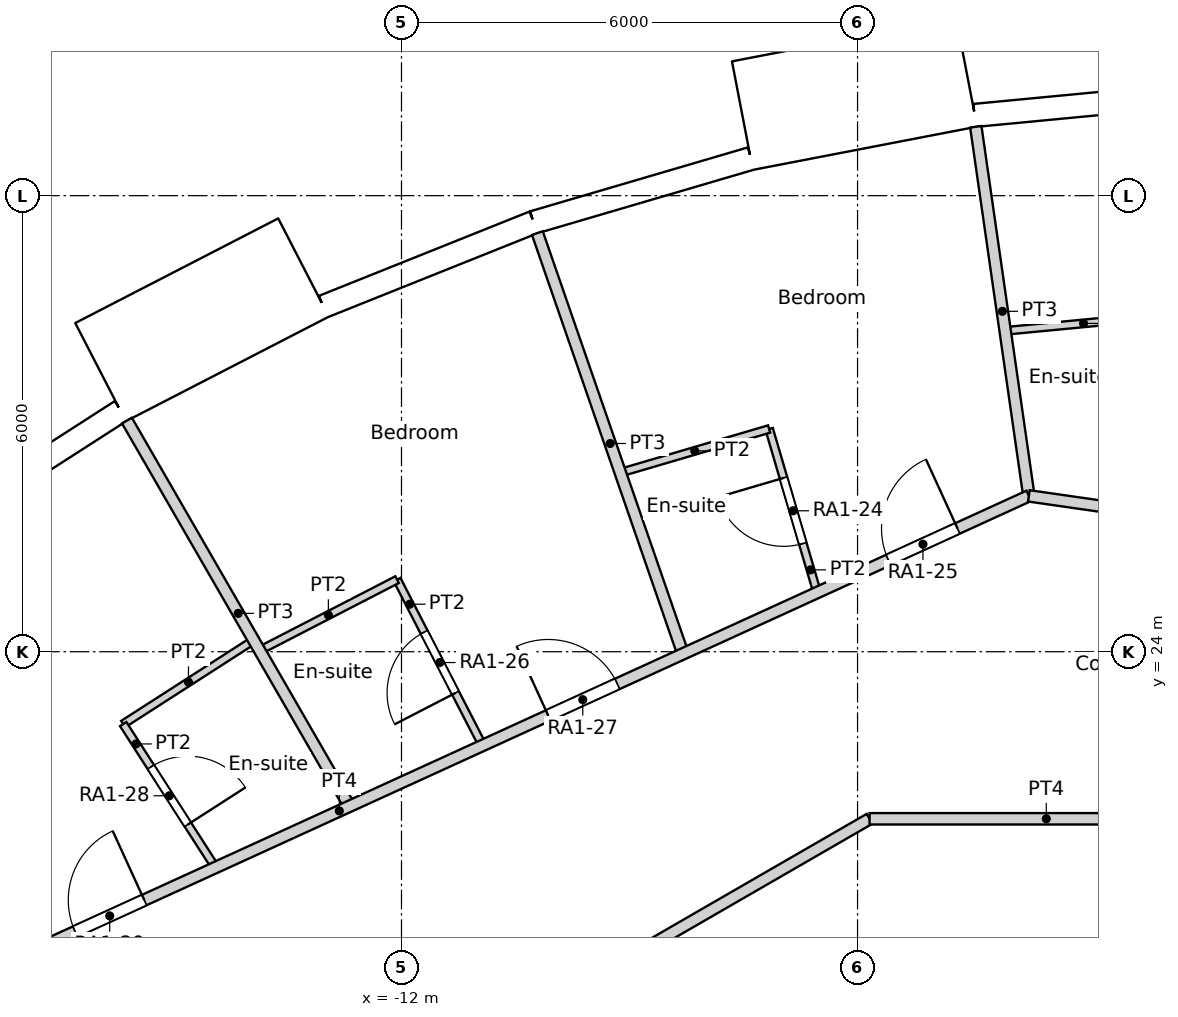
"""IFC4 building model, lengths in metres.
Left out: names, types, materials, properties, quantities, classifications, styles, units other than length and angle.
Written with IfcOpenShell. Run it as: python <this file> out.ifc"""

import sys

from ifc_helpers import new_model, si_unit, direction, frame, frame_2d, origin, origin_2d, place, context, subcontext, project, spatial, rectangle, circle, extrude, element, fill, save


model = new_model("IFC4")
c1 = context("Model", 3, precision=1e-05, world=origin(), true_north=direction((0.0, 1.0)))
c2 = subcontext(c1, "Body", "Model", "MODEL_VIEW")
j1 = project(units=[si_unit("LENGTHUNIT", "METRE"), si_unit("PLANEANGLEUNIT", "RADIAN")], contexts=[c1])
p1 = place(None, origin())
s1 = spatial("IfcSite", under=j1, at=p1, CompositionType="ELEMENT")
p2 = place(p1, origin())
s2 = spatial("IfcBuilding", under=s1, at=p2, CompositionType="ELEMENT")
p3 = place(p2, frame((0.0, 0.0, 28.2)))
s3 = spatial("IfcBuildingStorey", under=s2, at=p3, CompositionType="ELEMENT", Elevation=28.2)
for number, where, z_axis, x_axis in (
    (1, (-4.309, 29.966, 0.0), (0.0, 0.0, 1.0), (1.0, 0.0, 0.0)),
    (2, (-9.902, 28.61, 0.0), (0.0, 0.0, 1.0), (1.0, 0.0, 0.0)),
    (3, (-15.137, 26.219, 0.0), (0.0, 0.0, 1.0), (1.0, 0.0, 0.0)),
):
    element("IfcColumn", number, at=place(p3, frame(where, z_axis=z_axis, x_axis=x_axis)), inside=s3, PredefinedType="COLUMN", context=c2, shape_type="SweptSolid", body=[
        extrude(circle(Radius=0.7, at=origin_2d()), origin(), (0.0, 0.0, 1.0), 3.6),
    ])
for number, where, z_axis, x_axis in (
    (4, (-7.04, 23.516, 0.0), (0.0, 0.0, 1.0), (1.0, 0.0, 0.0)),
    (5, (-12.274, 21.259, 0.0), (0.0, 0.0, 1.0), (1.0, 0.0, 0.0)),
):
    element("IfcColumn", number, at=place(p3, frame(where, z_axis=z_axis, x_axis=x_axis)), inside=s3, PredefinedType="COLUMN", context=c2, shape_type="SweptSolid", body=[
        extrude(circle(Radius=0.75, at=origin_2d()), origin(), (0.0, 0.0, 1.0), 3.6),
    ])
p4 = place(p3, frame((-1.493, 31.339, 0.0), z_axis=(0.0, 0.0, 1.0), x_axis=(-0.995472611385, -0.095048829468, 0.0)))
e6 = element("IfcWall", 6, at=p4, inside=s3, PredefinedType="SOLIDWALL", context=c2, shape_type="SweptSolid", body=[
    extrude(rectangle(XDim=2.979, YDim=0.3, at=frame_2d((1.49, 0.0))), origin(), (0.0, 0.0, 1.0), 3.15),
])
p5 = place(p4, frame((1.49, 0.0, 1.55)))
e7 = element("IfcOpeningElement", 7, at=p5, cuts=e6, PredefinedType="OPENING", context=c2, shape_type="SweptSolid", body=[
    extrude(circle(Radius=0.9, at=origin_2d()), frame((0.0, 0.16, 0.0), z_axis=(0.0, -1.0, 0.0), x_axis=(1.0, 0.0, 0.0)), (0.0, 0.0, 1.0), 0.32),
])
p6 = place(p3, frame((-4.567, 31.621, -0.45), z_axis=(0.0, 0.0, 1.0), x_axis=(-0.981921602273, -0.189288052949, 0.0)))
e8 = element("IfcWall", 8, at=p6, inside=s3, PredefinedType="ELEMENTEDWALL", context=c2, shape_type="SweptSolid", body=[
    extrude(rectangle(XDim=3.0, YDim=1.45, at=frame_2d((1.5, 0.0))), origin(), (0.0, 0.0, 1.0), 3.6),
])
p7 = place(p6, frame((1.5, 0.0, 2.0)))
e9 = element("IfcOpeningElement", 9, at=p7, cuts=e8, PredefinedType="OPENING", context=c2, shape_type="SweptSolid", body=[
    extrude(circle(Radius=0.9, at=origin_2d()), frame((0.0, 0.735, 0.0), z_axis=(0.0, -1.0, 0.0), x_axis=(1.0, 0.0, 0.0)), (0.0, 0.0, 1.0), 1.47),
])
p8 = place(p3, frame((-7.403, 30.488, 0.0), z_axis=(0.0, 0.0, 1.0), x_axis=(-0.959501085144, -0.281704930036, 0.0)))
e10 = element("IfcWall", 10, at=p8, inside=s3, PredefinedType="SOLIDWALL", context=c2, shape_type="SweptSolid", body=[
    extrude(rectangle(XDim=2.979, YDim=0.3, at=frame_2d((1.49, 0.0))), origin(), (0.0, 0.0, 1.0), 3.15),
])
p9 = place(p8, frame((1.49, 0.0, 1.55)))
e11 = element("IfcOpeningElement", 11, at=p9, cuts=e10, PredefinedType="OPENING", context=c2, shape_type="SweptSolid", body=[
    extrude(circle(Radius=0.9, at=origin_2d()), frame((0.0, 0.16, 0.0), z_axis=(0.0, -1.0, 0.0), x_axis=(1.0, 0.0, 0.0)), (0.0, 0.0, 1.0), 0.32),
])
p10 = place(p3, frame((-10.261, 29.649, 0.0), z_axis=(0.0, 0.0, 1.0), x_axis=(-0.928374947, -0.371644935098, 0.0)))
e12 = element("IfcWall", 12, at=p10, inside=s3, PredefinedType="SOLIDWALL", context=c2, shape_type="SweptSolid", body=[
    extrude(rectangle(XDim=2.98, YDim=0.3, at=frame_2d((1.49, 0.0))), origin(), (0.0, 0.0, 1.0), 3.15),
])
p11 = place(p10, frame((1.49, 0.0, 1.55)))
e13 = element("IfcOpeningElement", 13, at=p11, cuts=e12, PredefinedType="OPENING", context=c2, shape_type="SweptSolid", body=[
    extrude(circle(Radius=0.9, at=origin_2d()), frame((0.0, 0.16, 0.0), z_axis=(0.0, -1.0, 0.0), x_axis=(1.0, 0.0, 0.0)), (0.0, 0.0, 1.0), 0.32),
])
p12 = place(p3, frame((-13.291, 29.053, -0.45), z_axis=(0.0, 0.0, 1.0), x_axis=(-0.888858064689, -0.458182650083, 0.0)))
e14 = element("IfcWall", 14, at=p12, inside=s3, PredefinedType="ELEMENTEDWALL", context=c2, shape_type="SweptSolid", body=[
    extrude(rectangle(XDim=3.0, YDim=1.45, at=frame_2d((1.5, 0.0))), origin(), (0.0, 0.0, 1.0), 3.6),
])
p13 = place(p12, frame((1.5, 0.0, 2.0)))
e15 = element("IfcOpeningElement", 15, at=p13, cuts=e14, PredefinedType="OPENING", context=c2, shape_type="SweptSolid", body=[
    extrude(circle(Radius=0.9, at=origin_2d()), frame((0.0, 0.735, 0.0), z_axis=(0.0, -1.0, 0.0), x_axis=(1.0, 0.0, 0.0)), (0.0, 0.0, 1.0), 1.47),
])
p14 = place(p3, frame((-15.692, 27.168, 0.0), z_axis=(0.0, 0.0, 1.0), x_axis=(-0.841260995538, -0.54062920508, 0.0)))
e16 = element("IfcWall", 16, at=p14, inside=s3, PredefinedType="SOLIDWALL", context=c2, shape_type="SweptSolid", body=[
    extrude(rectangle(XDim=2.979, YDim=0.3, at=frame_2d((1.49, 0.0))), origin(), (0.0, 0.0, 1.0), 3.15),
])
p15 = place(p14, frame((1.49, 0.0, 1.55)))
e17 = element("IfcOpeningElement", 17, at=p15, cuts=e16, PredefinedType="OPENING", context=c2, shape_type="SweptSolid", body=[
    extrude(circle(Radius=0.9, at=origin_2d()), frame((0.0, 0.16, 0.0), z_axis=(0.0, -1.0, 0.0), x_axis=(1.0, 0.0, 0.0)), (0.0, 0.0, 1.0), 0.32),
])
p16 = place(p3, frame((-5.842, 21.802, 0.0), z_axis=(0.0, 0.0, 1.0), x_axis=(1.0, 0.0, 0.0)))
e18 = element("IfcWall", 18, at=p16, inside=s3, PredefinedType="PARTITIONING", context=c2, shape_type="SweptSolid", body=[
    extrude(rectangle(XDim=4.65, YDim=0.15, at=frame_2d((2.325, 0.0))), origin(), (0.0, 0.0, 1.0), 3.15),
])
p17 = place(p3, frame((-14.0, 17.092, 0.0), z_axis=(0.0, 0.0, 1.0), x_axis=(0.86602719091, 0.499996904595, 0.0)))
e19 = element("IfcWall", 19, at=p17, inside=s3, PredefinedType="PARTITIONING", context=c2, shape_type="SweptSolid", body=[
    extrude(rectangle(XDim=9.42, YDim=0.15, at=frame_2d((4.71, 0.0))), origin(), (0.0, 0.0, 1.0), 3.15),
])
p18 = place(p3, frame((-3.746, 26.051, 0.0), z_axis=(0.0, 0.0, 1.0), x_axis=(0.989821009857, -0.142317843033, 0.0)))
e20 = element("IfcWall", 20, at=p18, inside=s3, PredefinedType="PARTITIONING", context=c2, shape_type="SweptSolid", body=[
    extrude(rectangle(XDim=14.83, YDim=0.15, at=frame_2d((7.415, 0.0))), origin(), (0.0, 0.0, 1.0), 3.15),
])
p19 = place(p18, frame((9.415, 0.0, 0.0)))
e21 = element("IfcOpeningElement", 21, at=p19, cuts=e20, PredefinedType="OPENING", context=c2, shape_type="SweptSolid", body=[
    extrude(rectangle(XDim=1.8, YDim=2.1, at=frame_2d((0.9, 1.05))), frame((0.0, 0.075, 0.0), z_axis=(0.0, -1.0, 0.0), x_axis=(1.0, 0.0, 0.0)), (0.0, 0.0, 1.0), 0.15),
])
p20 = place(p18, frame((3.314, 0.0, 0.0)))
e22 = element("IfcOpeningElement", 22, at=p20, cuts=e20, PredefinedType="OPENING", context=c2, shape_type="SweptSolid", body=[
    extrude(rectangle(XDim=1.0, YDim=2.1, at=frame_2d((0.5, 1.05))), frame((0.0, 0.075, 0.0), z_axis=(0.0, -1.0, 0.0), x_axis=(1.0, 0.0, 0.0)), (0.0, 0.0, 1.0), 0.15),
])
p21 = place(p3, frame((-17.234, 19.888, 0.0), z_axis=(0.0, 0.0, 1.0), x_axis=(0.90953867323, 0.415619299238, 0.0)))
e23 = element("IfcWall", 23, at=p21, inside=s3, PredefinedType="PARTITIONING", context=c2, shape_type="SweptSolid", body=[
    extrude(rectangle(XDim=14.829, YDim=0.15, at=frame_2d((7.415, 0.0))), origin(), (0.0, 0.0, 1.0), 3.15),
])
p22 = place(p21, frame((12.797, 0.0, 0.0)))
e24 = element("IfcOpeningElement", 24, at=p22, cuts=e23, PredefinedType="OPENING", context=c2, shape_type="SweptSolid", body=[
    extrude(rectangle(XDim=1.0, YDim=2.1, at=frame_2d((0.5, 1.05))), frame((0.0, 0.075, 0.0), z_axis=(0.0, -1.0, 0.0), x_axis=(1.0, 0.0, 0.0)), (0.0, 0.0, 1.0), 0.15),
])
p23 = place(p21, frame((7.877, 0.0, 0.0)))
e25 = element("IfcOpeningElement", 25, at=p23, cuts=e23, PredefinedType="OPENING", context=c2, shape_type="SweptSolid", body=[
    extrude(rectangle(XDim=1.0, YDim=2.1, at=frame_2d((0.5, 1.05))), frame((0.0, 0.075, 0.0), z_axis=(0.0, -1.0, 0.0), x_axis=(1.0, 0.0, 0.0)), (0.0, 0.0, 1.0), 0.15),
])
p24 = place(p21, frame((1.034, 0.0, 0.0)))
e26 = element("IfcOpeningElement", 26, at=p24, cuts=e23, PredefinedType="OPENING", context=c2, shape_type="SweptSolid", body=[
    extrude(rectangle(XDim=1.0, YDim=2.1, at=frame_2d((0.5, 1.05))), frame((0.0, 0.075, 0.0), z_axis=(0.0, -1.0, 0.0), x_axis=(1.0, 0.0, 0.0)), (0.0, 0.0, 1.0), 0.15),
])
p25 = place(p3, frame((-4.058, 28.221, 0.0), z_axis=(0.0, 0.0, 1.0), x_axis=(0.995466291052, 0.095115000814, 0.0)))
e27 = element("IfcWall", 27, at=p25, inside=s3, PredefinedType="PARTITIONING", context=c2, shape_type="SweptSolid", body=[
    extrude(rectangle(XDim=2.071, YDim=0.1, at=frame_2d((1.036, 0.0))), origin(), (0.0, 0.0, 1.0), 3.15),
])
p26 = place(p3, frame((-4.444, 30.906, 0.0), z_axis=(0.0, 0.0, 1.0), x_axis=(0.142306296561, -0.989822669956, 0.0)))
e28 = element("IfcWall", 28, at=p26, inside=s3, PredefinedType="PARTITIONING", context=c2, shape_type="SweptSolid", body=[
    extrude(rectangle(XDim=4.905, YDim=0.15, at=frame_2d((2.452, 0.0))), origin(), (0.0, 0.0, 1.0), 3.15),
])
p27 = place(p3, frame((-7.163, 26.93, 0.0), z_axis=(0.0, 0.0, 1.0), x_axis=(0.281948165188, -0.959429638977, 0.0)))
e29 = element("IfcWall", 29, at=p27, inside=s3, PredefinedType="PARTITIONING", context=c2, shape_type="SweptSolid", body=[
    extrude(rectangle(XDim=2.242, YDim=0.1, at=frame_2d((1.121, 0.0))), origin(), (0.0, 0.0, 1.0), 3.15),
])
p28 = place(p27, frame((0.671, 0.0, 0.0)))
e30 = element("IfcOpeningElement", 30, at=p28, cuts=e29, PredefinedType="OPENING", context=c2, shape_type="SweptSolid", body=[
    extrude(rectangle(XDim=0.9, YDim=2.04, at=frame_2d((0.45, 1.02))), frame((0.0, 0.05, 0.0), z_axis=(0.0, -1.0, 0.0), x_axis=(1.0, 0.0, 0.0)), (0.0, 0.0, 1.0), 0.1),
])
p29 = place(p3, frame((-9.121, 26.355, 0.0), z_axis=(0.0, 0.0, 1.0), x_axis=(0.95948923736, 0.281745281045, 0.0)))
e31 = element("IfcWall", 31, at=p29, inside=s3, PredefinedType="PARTITIONING", context=c2, shape_type="SweptSolid", body=[
    extrude(rectangle(XDim=2.041, YDim=0.1, at=frame_2d((1.021, 0.0))), origin(), (0.0, 0.0, 1.0), 3.15),
])
p30 = place(p3, frame((-10.212, 29.507, 0.0), z_axis=(0.0, 0.0, 1.0), x_axis=(0.327061884856, -0.945002922469, 0.0)))
e32 = element("IfcWall", 32, at=p30, inside=s3, PredefinedType="PARTITIONING", context=c2, shape_type="SweptSolid", body=[
    extrude(rectangle(XDim=5.857, YDim=0.15, at=frame_2d((2.928, 0.0))), origin(), (0.0, 0.0, 1.0), 3.15),
])
p31 = place(p3, frame((-12.058, 24.948, 0.0), z_axis=(0.0, 0.0, 1.0), x_axis=(0.458287904527, -0.888803800939, 0.0)))
e33 = element("IfcWall", 33, at=p31, inside=s3, PredefinedType="PARTITIONING", context=c2, shape_type="SweptSolid", body=[
    extrude(rectangle(XDim=2.453, YDim=0.1, at=frame_2d((1.226, 0.0))), origin(), (0.0, 0.0, 1.0), 3.15),
])
p32 = place(p31, frame((0.777, 0.0, 0.0)))
e34 = element("IfcOpeningElement", 34, at=p32, cuts=e33, PredefinedType="OPENING", context=c2, shape_type="SweptSolid", body=[
    extrude(rectangle(XDim=0.9, YDim=2.04, at=frame_2d((0.45, 1.02))), frame((0.0, 0.05, 0.0), z_axis=(0.0, -1.0, 0.0), x_axis=(1.0, 0.0, 0.0)), (0.0, 0.0, 1.0), 0.1),
])
p33 = place(p3, frame((-13.866, 24.016, 0.0), z_axis=(0.0, 0.0, 1.0), x_axis=(0.888861985525, 0.45817504372, 0.0)))
e35 = element("IfcWall", 35, at=p33, inside=s3, PredefinedType="PARTITIONING", context=c2, shape_type="SweptSolid", body=[
    extrude(rectangle(XDim=2.034, YDim=0.1, at=frame_2d((1.017, 0.0))), origin(), (0.0, 0.0, 1.0), 3.15),
])
p34 = place(p3, frame((-15.612, 27.041, 0.0), z_axis=(0.0, 0.0, 1.0), x_axis=(0.499824700643, -0.866126589262, 0.0)))
e36 = element("IfcWall", 36, at=p34, inside=s3, PredefinedType="PARTITIONING", context=c2, shape_type="SweptSolid", body=[
    extrude(rectangle(XDim=5.856, YDim=0.15, at=frame_2d((2.928, 0.0))), origin(), (0.0, 0.0, 1.0), 3.15),
])
p35 = place(p3, frame((-15.661, 23.048, 0.0), z_axis=(0.0, 0.0, 1.0), x_axis=(0.84110074148, 0.540878491606, 0.0)))
e37 = element("IfcWall", 37, at=p35, inside=s3, PredefinedType="PARTITIONING", context=c2, shape_type="SweptSolid", body=[
    extrude(rectangle(XDim=2.041, YDim=0.1, at=frame_2d((1.021, 0.0))), origin(), (0.0, 0.0, 1.0), 3.15),
])
p36 = place(p3, frame((-15.661, 23.048, 0.0), z_axis=(0.0, 0.0, 1.0), x_axis=(0.540796133976, -0.841153696702, 0.0)))
e38 = element("IfcWall", 38, at=p36, inside=s3, PredefinedType="PARTITIONING", context=c2, shape_type="SweptSolid", body=[
    extrude(rectangle(XDim=2.241, YDim=0.1, at=frame_2d((1.121, 0.0))), origin(), (0.0, 0.0, 1.0), 3.15),
])
p37 = place(p36, frame((0.671, 0.0, 0.0)))
e39 = element("IfcOpeningElement", 39, at=p37, cuts=e38, PredefinedType="OPENING", context=c2, shape_type="SweptSolid", body=[
    extrude(rectangle(XDim=0.9, YDim=2.04, at=frame_2d((0.45, 1.02))), frame((0.0, 0.05, 0.0), z_axis=(0.0, -1.0, 0.0), x_axis=(1.0, 0.0, 0.0)), (0.0, 0.0, 1.0), 0.1),
])
p38 = place(p5, origin())
e40 = element("IfcWindow", 40, at=p38, inside=s3, PartitioningType="SINGLE_PANEL", PredefinedType="WINDOW", context=c2, shape_type="SweptSolid", body=[
    extrude(circle(Radius=0.9, at=origin_2d()), frame((0.0, 0.12, 0.0), z_axis=(0.0, -1.0, 0.0), x_axis=(1.0, 0.0, 0.0)), (0.0, 0.0, 1.0), 0.1),
])
fill(e7, e40)
p39 = place(p7, origin())
e41 = element("IfcWindow", 41, at=p39, inside=s3, PartitioningType="SINGLE_PANEL", PredefinedType="WINDOW", context=c2, shape_type="SweptSolid", body=[
    extrude(circle(Radius=0.9, at=origin_2d()), frame((0.0, 0.695, 0.0), z_axis=(0.0, -1.0, 0.0), x_axis=(1.0, 0.0, 0.0)), (0.0, 0.0, 1.0), 0.1),
])
fill(e9, e41)
p40 = place(p9, origin())
e42 = element("IfcWindow", 42, at=p40, inside=s3, PartitioningType="SINGLE_PANEL", PredefinedType="WINDOW", context=c2, shape_type="SweptSolid", body=[
    extrude(circle(Radius=0.9, at=origin_2d()), frame((0.0, 0.12, 0.0), z_axis=(0.0, -1.0, 0.0), x_axis=(1.0, 0.0, 0.0)), (0.0, 0.0, 1.0), 0.1),
])
fill(e11, e42)
p41 = place(p11, origin())
e43 = element("IfcWindow", 43, at=p41, inside=s3, PartitioningType="SINGLE_PANEL", PredefinedType="WINDOW", context=c2, shape_type="SweptSolid", body=[
    extrude(circle(Radius=0.9, at=origin_2d()), frame((0.0, 0.12, 0.0), z_axis=(0.0, -1.0, 0.0), x_axis=(1.0, 0.0, 0.0)), (0.0, 0.0, 1.0), 0.1),
])
fill(e13, e43)
p42 = place(p13, origin())
e44 = element("IfcWindow", 44, at=p42, inside=s3, PartitioningType="SINGLE_PANEL", PredefinedType="WINDOW", context=c2, shape_type="SweptSolid", body=[
    extrude(circle(Radius=0.9, at=origin_2d()), frame((0.0, 0.695, 0.0), z_axis=(0.0, -1.0, 0.0), x_axis=(1.0, 0.0, 0.0)), (0.0, 0.0, 1.0), 0.1),
])
fill(e15, e44)
p43 = place(p15, origin())
e45 = element("IfcWindow", 45, at=p43, inside=s3, PartitioningType="SINGLE_PANEL", PredefinedType="WINDOW", context=c2, shape_type="SweptSolid", body=[
    extrude(circle(Radius=0.9, at=origin_2d()), frame((0.0, 0.12, 0.0), z_axis=(0.0, -1.0, 0.0), x_axis=(1.0, 0.0, 0.0)), (0.0, 0.0, 1.0), 0.1),
])
fill(e17, e45)
p44 = place(p28, origin())
e46 = element("IfcDoor", 46, at=p44, inside=s3, OperationType="SINGLE_SWING_RIGHT", PredefinedType="DOOR", context=c2, shape_type="SweptSolid", body=[
    extrude(rectangle(XDim=0.9, YDim=2.04, at=frame_2d((0.45, 1.02))), frame((0.0, 0.025, 0.0), z_axis=(0.0, -1.0, 0.0), x_axis=(1.0, 0.0, 0.0)), (0.0, 0.0, 1.0), 0.05),
])
fill(e30, e46)
p45 = place(p22, origin())
e47 = element("IfcDoor", 47, at=p45, inside=s3, OperationType="SINGLE_SWING_RIGHT", PredefinedType="DOOR", context=c2, shape_type="SweptSolid", body=[
    extrude(rectangle(XDim=1.0, YDim=2.1, at=frame_2d((0.5, 1.05))), frame((0.0, 0.025, 0.0), z_axis=(0.0, -1.0, 0.0), x_axis=(1.0, 0.0, 0.0)), (0.0, 0.0, 1.0), 0.05),
])
fill(e24, e47)
p46 = place(p32, origin())
e48 = element("IfcDoor", 48, at=p46, inside=s3, OperationType="SINGLE_SWING_LEFT", PredefinedType="DOOR", context=c2, shape_type="SweptSolid", body=[
    extrude(rectangle(XDim=0.9, YDim=2.04, at=frame_2d((0.45, 1.02))), frame((0.0, 0.025, 0.0), z_axis=(0.0, -1.0, 0.0), x_axis=(1.0, 0.0, 0.0)), (0.0, 0.0, 1.0), 0.05),
])
fill(e34, e48)
p47 = place(p23, origin())
e49 = element("IfcDoor", 49, at=p47, inside=s3, OperationType="SINGLE_SWING_LEFT", PredefinedType="DOOR", context=c2, shape_type="SweptSolid", body=[
    extrude(rectangle(XDim=1.0, YDim=2.1, at=frame_2d((0.5, 1.05))), frame((0.0, 0.025, 0.0), z_axis=(0.0, -1.0, 0.0), x_axis=(1.0, 0.0, 0.0)), (0.0, 0.0, 1.0), 0.05),
])
fill(e25, e49)
p48 = place(p37, origin())
e50 = element("IfcDoor", 50, at=p48, inside=s3, OperationType="SINGLE_SWING_RIGHT", PredefinedType="DOOR", context=c2, shape_type="SweptSolid", body=[
    extrude(rectangle(XDim=0.9, YDim=2.04, at=frame_2d((0.45, 1.02))), frame((0.0, 0.025, 0.0), z_axis=(0.0, -1.0, 0.0), x_axis=(1.0, 0.0, 0.0)), (0.0, 0.0, 1.0), 0.05),
])
fill(e39, e50)
p49 = place(p24, origin())
e51 = element("IfcDoor", 51, at=p49, inside=s3, OperationType="SINGLE_SWING_RIGHT", PredefinedType="DOOR", context=c2, shape_type="SweptSolid", body=[
    extrude(rectangle(XDim=1.0, YDim=2.1, at=frame_2d((0.5, 1.05))), frame((0.0, 0.025, 0.0), z_axis=(0.0, -1.0, 0.0), x_axis=(1.0, 0.0, 0.0)), (0.0, 0.0, 1.0), 0.05),
])
fill(e26, e51)
save(model, sys.argv[1])
